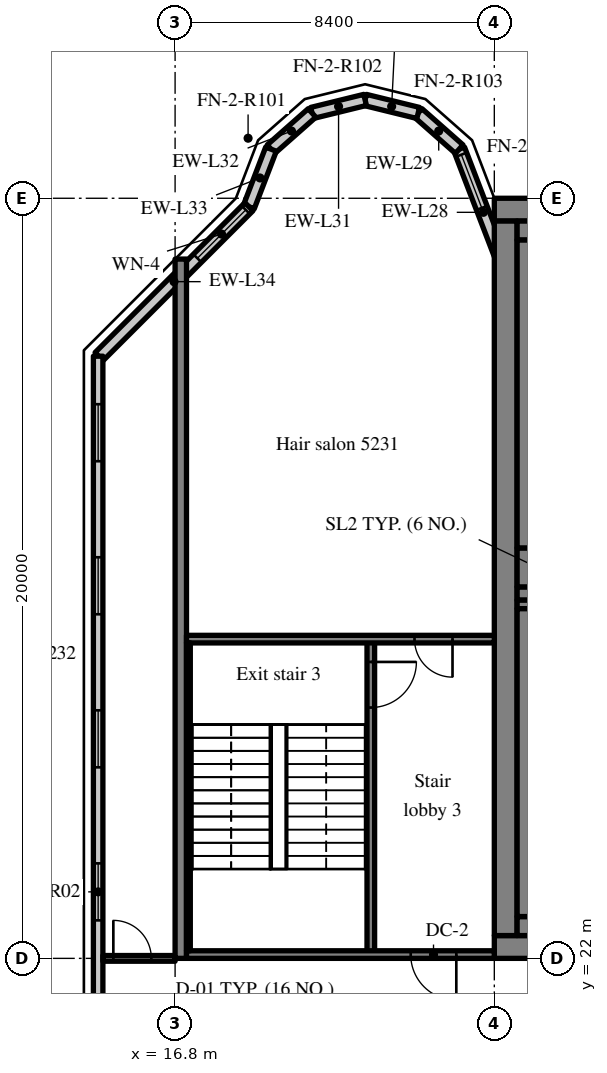
"""IFC4 building model, lengths in metres.
Left out: names, types, materials, properties, quantities, classifications, styles, units other than length and angle.
Written with IfcOpenShell. Run it as: python <this file> out.ifc"""

import sys

from ifc_helpers import new_model, si_unit, direction, frame, frame_2d, origin, place, context, subcontext, project, spatial, rectangle, extrude, source, transform, mapped, element, fill, save


model = new_model("IFC4")
c1 = context("Model", 3, precision=1e-05, world=origin(), true_north=direction((0.0, 1.0)))
c2 = subcontext(c1, "Body", "Model", "MODEL_VIEW")
j1 = project(units=[si_unit("LENGTHUNIT", "METRE"), si_unit("PLANEANGLEUNIT", "RADIAN")], contexts=[c1])
p1 = place(None, origin())
s1 = spatial("IfcSite", under=j1, at=p1, CompositionType="ELEMENT")
p2 = place(p1, origin())
s2 = spatial("IfcBuilding", under=s1, at=p2, CompositionType="ELEMENT")
p3 = place(p2, frame((0.0, 0.0, 217.9)))
s3 = spatial("IfcBuildingStorey", under=s2, at=p3, CompositionType="ELEMENT", Elevation=217.9)
m1 = source(origin(), c2, "Body", "SweptSolid", [
    extrude(rectangle(XDim=50.4, YDim=0.6, at=frame_2d((25.2, 0.0))), origin(), (0.0, 0.0, 1.0), 3.62),
])
p4 = place(p3, frame((25.2, 22.3, 0.0), z_axis=(0.0, 0.0, 1.0), x_axis=(1.0, 0.0, 0.0)))
e1 = element("IfcWall", 1, at=p4, inside=s3, PredefinedType="SHEAR", context=c2, shape_type="MappedRepresentation", body=[
    mapped(m1, transform((0.0, 0.0, 0.0), scale=1.0)),
])
m2 = source(origin(), c2, "Body", "SweptSolid", [
    extrude(rectangle(XDim=1.8, YDim=2.1, at=frame_2d((0.9, 1.05))), frame((0.0, 0.31, 0.0), z_axis=(0.0, -1.0, 0.0), x_axis=(1.0, 0.0, 0.0)), (0.0, 0.0, 1.0), 0.62),
])
p5 = place(p4, frame((15.9, 0.0, 0.0)))
e2 = element("IfcOpeningElement", 2, at=p5, cuts=e1, PredefinedType="OPENING", context=c2, shape_type="MappedRepresentation", body=[
    mapped(m2, transform((0.0, 0.0, 0.0), scale=1.0)),
])
m3 = source(origin(), c2, "Body", "SweptSolid", [
    extrude(rectangle(XDim=0.9, YDim=2.1, at=frame_2d((0.45, 1.05))), frame((0.0, 0.31, 0.0), z_axis=(0.0, -1.0, 0.0), x_axis=(1.0, 0.0, 0.0)), (0.0, 0.0, 1.0), 0.62),
])
p6 = place(p4, frame((9.687, 0.0, 0.0)))
e3 = element("IfcOpeningElement", 3, at=p6, cuts=e1, PredefinedType="OPENING", context=c2, shape_type="MappedRepresentation", body=[
    mapped(m3, transform((0.0, 0.0, 0.0), scale=1.0)),
])
p7 = place(p4, frame((21.513, 0.0, 0.0)))
e4 = element("IfcOpeningElement", 4, at=p7, cuts=e1, PredefinedType="OPENING", context=c2, shape_type="MappedRepresentation", body=[
    mapped(m3, transform((0.0, 0.0, 0.0), scale=1.0)),
])
p8 = place(p4, frame((32.7, 0.0, 0.0)))
e5 = element("IfcOpeningElement", 5, at=p8, cuts=e1, PredefinedType="OPENING", context=c2, shape_type="MappedRepresentation", body=[
    mapped(m2, transform((0.0, 0.0, 0.0), scale=1.0)),
])
m4 = source(origin(), c2, "Body", "SweptSolid", [
    extrude(rectangle(XDim=1.2, YDim=2.1, at=frame_2d((0.6, 1.05))), frame((0.0, 0.31, 0.0), z_axis=(0.0, -1.0, 0.0), x_axis=(1.0, 0.0, 0.0)), (0.0, 0.0, 1.0), 0.62),
])
p9 = place(p4, frame((6.488, 0.0, 0.0)))
e6 = element("IfcOpeningElement", 6, at=p9, cuts=e1, PredefinedType="OPENING", context=c2, shape_type="MappedRepresentation", body=[
    mapped(m4, transform((0.0, 0.0, 0.0), scale=1.0)),
])
p10 = place(p4, frame((47.925, 0.0, 0.0)))
e7 = element("IfcOpeningElement", 7, at=p10, cuts=e1, PredefinedType="OPENING", context=c2, shape_type="MappedRepresentation", body=[
    mapped(m4, transform((0.0, 0.0, 0.0), scale=1.0)),
])
p11 = place(p3, frame((25.2, 41.7, 0.0), z_axis=(0.0, 0.0, 1.0), x_axis=(1.0, 0.0, 0.0)))
e8 = element("IfcWall", 8, at=p11, inside=s3, PredefinedType="SHEAR", context=c2, shape_type="MappedRepresentation", body=[
    mapped(m1, transform((0.0, 0.0, 0.0), scale=1.0)),
])
m5 = source(origin(), c2, "Body", "SweptSolid", [
    extrude(rectangle(XDim=18.8, YDim=0.6, at=frame_2d((9.4, 0.0))), origin(), (0.0, 0.0, 1.0), 3.62),
])
p12 = place(p3, frame((25.5, 22.6, 0.0), z_axis=(0.0, 0.0, 1.0), x_axis=(0.0, 1.0, 0.0)))
e9 = element("IfcWall", 9, at=p12, inside=s3, PredefinedType="SHEAR", context=c2, shape_type="MappedRepresentation", body=[
    mapped(m5, transform((0.0, 0.0, 0.0), scale=1.0)),
])
m6 = source(origin(), c2, "Body", "SweptSolid", [
    extrude(rectangle(XDim=7.625, YDim=0.35, at=frame_2d((3.812, 0.0))), origin(), (0.0, 0.0, 1.0), 3.62),
])
p13 = place(p3, frame((25.8, 31.6, 0.0), z_axis=(0.0, 0.0, 1.0), x_axis=(1.0, 0.0, 0.0)))
e10 = element("IfcWall", 10, at=p13, inside=s3, PredefinedType="SHEAR", context=c2, shape_type="MappedRepresentation", body=[
    mapped(m6, transform((0.0, 0.0, 0.0), scale=1.0)),
])
m7 = source(origin(), c2, "Body", "SweptSolid", [
    extrude(rectangle(XDim=1.1, YDim=2.1, at=frame_2d((0.55, 1.05))), frame((0.0, 0.185, 0.0), z_axis=(0.0, -1.0, 0.0), x_axis=(1.0, 0.0, 0.0)), (0.0, 0.0, 1.0), 0.37),
])
p14 = place(p13, frame((5.938, 0.0, 0.0)))
e11 = element("IfcOpeningElement", 11, at=p14, cuts=e10, PredefinedType="OPENING", context=c2, shape_type="MappedRepresentation", body=[
    mapped(m7, transform((0.0, 0.0, 0.0), scale=1.0)),
])
m8 = source(origin(), c2, "Body", "SweptSolid", [
    extrude(rectangle(XDim=18.4, YDim=0.3, at=frame_2d((9.2, 0.0))), origin(), (0.0, 0.0, 1.0), 3.62),
])
p15 = place(p3, frame((16.95, 22.0, 0.0), z_axis=(0.0, 0.0, 1.0), x_axis=(0.0, 1.0, 0.0)))
e12 = element("IfcWall", 12, at=p15, inside=s3, PredefinedType="SHEAR", context=c2, shape_type="MappedRepresentation", body=[
    mapped(m8, transform((0.0, 0.0, 0.0), scale=1.0)),
])
m9 = source(origin(), c2, "Body", "SweptSolid", [
    extrude(rectangle(XDim=3.559, YDim=0.3, at=frame_2d((1.78, 0.0))), origin(), (0.0, 0.0, 1.0), 3.62),
])
p16 = place(p3, frame((25.55, 39.969, 0.0), z_axis=(0.0, 0.0, 1.0), x_axis=(-0.35779745313, 0.933799219604, 0.0)))
e13 = element("IfcWall", 13, at=p16, inside=s3, PredefinedType="SOLIDWALL", context=c2, shape_type="MappedRepresentation", body=[
    mapped(m9, transform((0.0, 0.0, 0.0), scale=1.0)),
])
m10 = source(origin(), c2, "Body", "SweptSolid", [
    extrude(rectangle(XDim=1.5, YDim=2.0, at=frame_2d((0.75, 1.0))), frame((0.0, 0.16, 0.0), z_axis=(0.0, -1.0, 0.0), x_axis=(1.0, 0.0, 0.0)), (0.0, 0.0, 1.0), 0.32),
])
p17 = place(p16, frame((1.903, 0.0, 0.9)))
e14 = element("IfcOpeningElement", 14, at=p17, cuts=e13, PredefinedType="OPENING", context=c2, shape_type="MappedRepresentation", body=[
    mapped(m10, transform((0.0, 0.0, 0.0), scale=1.0)),
])
m11 = source(origin(), c2, "Body", "SweptSolid", [
    extrude(rectangle(XDim=1.44, YDim=0.3, at=frame_2d((0.72, 0.0))), origin(), (0.0, 0.0, 1.0), 3.62),
])
p18 = place(p3, frame((24.277, 43.292, 0.0), z_axis=(0.0, 0.0, 1.0), x_axis=(-0.749649827867, 0.661834673902, 0.0)))
e15 = element("IfcWall", 15, at=p18, inside=s3, PredefinedType="SOLIDWALL", context=c2, shape_type="MappedRepresentation", body=[
    mapped(m11, transform((0.0, 0.0, 0.0), scale=1.0)),
])
m12 = source(origin(), c2, "Body", "SweptSolid", [
    extrude(rectangle(XDim=1.438, YDim=0.3, at=frame_2d((0.719, 0.0))), origin(), (0.0, 0.0, 1.0), 3.62),
])
p19 = place(p3, frame((23.197, 44.245, 0.0), z_axis=(0.0, 0.0, 1.0), x_axis=(-0.971152283879, 0.238460146601, 0.0)))
e16 = element("IfcWall", 16, at=p19, inside=s3, PredefinedType="SOLIDWALL", context=c2, shape_type="MappedRepresentation", body=[
    mapped(m12, transform((0.0, 0.0, 0.0), scale=1.0)),
])
m13 = source(origin(), c2, "Body", "SweptSolid", [
    extrude(rectangle(XDim=1.439, YDim=0.3, at=frame_2d((0.719, 0.0))), origin(), (0.0, 0.0, 1.0), 3.62),
])
p20 = place(p3, frame((21.8, 44.588, 0.0), z_axis=(0.0, 0.0, 1.0), x_axis=(-0.971161932466, -0.238420848351, 0.0)))
e17 = element("IfcWall", 17, at=p20, inside=s3, PredefinedType="SOLIDWALL", context=c2, shape_type="MappedRepresentation", body=[
    mapped(m13, transform((0.0, 0.0, 0.0), scale=1.0)),
])
m14 = source(origin(), c2, "Body", "SweptSolid", [
    extrude(rectangle(XDim=1.44, YDim=0.3, at=frame_2d((0.72, 0.0))), origin(), (0.0, 0.0, 1.0), 3.62),
])
p21 = place(p3, frame((20.403, 44.245, 0.0), z_axis=(0.0, 0.0, 1.0), x_axis=(-0.74957555648, -0.661918790432, 0.0)))
e18 = element("IfcWall", 18, at=p21, inside=s3, PredefinedType="SOLIDWALL", context=c2, shape_type="MappedRepresentation", body=[
    mapped(m14, transform((0.0, 0.0, 0.0), scale=1.0)),
])
m15 = source(origin(), c2, "Body", "SweptSolid", [
    extrude(rectangle(XDim=1.622, YDim=0.3, at=frame_2d((0.811, 0.0))), origin(), (0.0, 0.0, 1.0), 3.62),
])
p22 = place(p3, frame((19.323, 43.292, 0.0), z_axis=(0.0, 0.0, 1.0), x_axis=(-0.357778527068, -0.933806471154, 0.0)))
e19 = element("IfcWall", 19, at=p22, inside=s3, PredefinedType="SOLIDWALL", context=c2, shape_type="MappedRepresentation", body=[
    mapped(m15, transform((0.0, 0.0, 0.0), scale=1.0)),
])
m16 = source(origin(), c2, "Body", "SweptSolid", [
    extrude(rectangle(XDim=5.576, YDim=0.3, at=frame_2d((2.788, 0.0))), origin(), (0.0, 0.0, 1.0), 3.62),
])
p23 = place(p3, frame((18.743, 41.777, 0.0), z_axis=(0.0, 0.0, 1.0), x_axis=(-0.707106781187, -0.707106781187, 0.0)))
e20 = element("IfcWall", 20, at=p23, inside=s3, PredefinedType="SOLIDWALL", context=c2, shape_type="MappedRepresentation", body=[
    mapped(m16, transform((0.0, 0.0, 0.0), scale=1.0)),
])
m17 = source(origin(), c2, "Body", "SweptSolid", [
    extrude(rectangle(XDim=1.8, YDim=1.5, at=frame_2d((0.9, 0.75))), frame((0.0, 0.16, 0.0), z_axis=(0.0, -1.0, 0.0), x_axis=(1.0, 0.0, 0.0)), (0.0, 0.0, 1.0), 0.32),
])
p24 = place(p23, frame((0.118, 0.0, 0.9)))
e21 = element("IfcOpeningElement", 21, at=p24, cuts=e20, PredefinedType="OPENING", context=c2, shape_type="MappedRepresentation", body=[
    mapped(m17, transform((0.0, 0.0, 0.0), scale=1.0)),
])
m18 = source(origin(), c2, "Body", "SweptSolid", [
    extrude(rectangle(XDim=28.189, YDim=0.25, at=frame_2d((14.095, 0.0))), origin(), (0.0, 0.0, 1.0), 3.62),
])
p25 = place(p3, frame((14.775, 37.845, 0.0), z_axis=(0.0, 0.0, 1.0), x_axis=(0.0, -1.0, 0.0)))
e22 = element("IfcWall", 22, at=p25, inside=s3, PredefinedType="SOLIDWALL", context=c2, shape_type="MappedRepresentation", body=[
    mapped(m18, transform((0.0, 0.0, 0.0), scale=1.0)),
])
m19 = source(origin(), c2, "Body", "SweptSolid", [
    extrude(rectangle(XDim=1.5, YDim=1.5, at=frame_2d((0.75, 0.75))), frame((0.0, 0.135, 0.0), z_axis=(0.0, -1.0, 0.0), x_axis=(1.0, 0.0, 0.0)), (0.0, 0.0, 1.0), 0.27),
])
p26 = place(p25, frame((1.263, 0.0, 0.9)))
e23 = element("IfcOpeningElement", 23, at=p26, cuts=e22, PredefinedType="OPENING", context=c2, shape_type="MappedRepresentation", body=[
    mapped(m19, transform((0.0, 0.0, 0.0), scale=1.0)),
])
p27 = place(p25, frame((5.291, 0.0, 0.9)))
e24 = element("IfcOpeningElement", 24, at=p27, cuts=e22, PredefinedType="OPENING", context=c2, shape_type="MappedRepresentation", body=[
    mapped(m19, transform((0.0, 0.0, 0.0), scale=1.0)),
])
p28 = place(p25, frame((9.318, 0.0, 0.9)))
e25 = element("IfcOpeningElement", 25, at=p28, cuts=e22, PredefinedType="OPENING", context=c2, shape_type="MappedRepresentation", body=[
    mapped(m19, transform((0.0, 0.0, 0.0), scale=1.0)),
])
p29 = place(p25, frame((13.345, 0.0, 0.9)))
e26 = element("IfcOpeningElement", 26, at=p29, cuts=e22, PredefinedType="OPENING", context=c2, shape_type="MappedRepresentation", body=[
    mapped(m19, transform((0.0, 0.0, 0.0), scale=1.0)),
])
p30 = place(p25, frame((17.372, 0.0, 0.9)))
e27 = element("IfcOpeningElement", 27, at=p30, cuts=e22, PredefinedType="OPENING", context=c2, shape_type="MappedRepresentation", body=[
    mapped(m19, transform((0.0, 0.0, 0.0), scale=1.0)),
])
p31 = place(p25, frame((21.399, 0.0, 0.9)))
e28 = element("IfcOpeningElement", 28, at=p31, cuts=e22, PredefinedType="OPENING", context=c2, shape_type="MappedRepresentation", body=[
    mapped(m19, transform((0.0, 0.0, 0.0), scale=1.0)),
])
p32 = place(p25, frame((25.426, 0.0, 0.9)))
e29 = element("IfcOpeningElement", 29, at=p32, cuts=e22, PredefinedType="OPENING", context=c2, shape_type="MappedRepresentation", body=[
    mapped(m19, transform((0.0, 0.0, 0.0), scale=1.0)),
])
m20 = source(origin(), c2, "Body", "SweptSolid", [
    extrude(rectangle(XDim=8.3, YDim=0.2, at=frame_2d((4.15, 0.0))), origin(), (0.0, 0.0, 1.0), 3.62),
])
p33 = place(p3, frame((21.95, 22.1, 0.0), z_axis=(0.0, 0.0, 1.0), x_axis=(0.0, 1.0, 0.0)))
e30 = element("IfcWall", 30, at=p33, inside=s3, PredefinedType="SOLIDWALL", context=c2, shape_type="MappedRepresentation", body=[
    mapped(m20, transform((0.0, 0.0, 0.0), scale=1.0)),
])
m21 = source(origin(), c2, "Body", "SweptSolid", [
    extrude(rectangle(XDim=1.2, YDim=2.1, at=frame_2d((0.6, 1.05))), frame((0.0, 0.11, 0.0), z_axis=(0.0, -1.0, 0.0), x_axis=(1.0, 0.0, 0.0)), (0.0, 0.0, 1.0), 0.22),
])
p34 = place(p33, frame((6.5, 0.0, 0.0)))
e31 = element("IfcOpeningElement", 31, at=p34, cuts=e30, PredefinedType="OPENING", context=c2, shape_type="MappedRepresentation", body=[
    mapped(m21, transform((0.0, 0.0, 0.0), scale=1.0)),
])
m22 = source(origin(), c2, "Body", "SweptSolid", [
    extrude(rectangle(XDim=8.1, YDim=0.2, at=frame_2d((4.05, 0.0))), origin(), (0.0, 0.0, 1.0), 3.62),
])
p35 = place(p3, frame((17.1, 22.1, 0.0), z_axis=(0.0, 0.0, 1.0), x_axis=(1.0, 0.0, 0.0)))
e32 = element("IfcWall", 32, at=p35, inside=s3, PredefinedType="SOLIDWALL", context=c2, shape_type="MappedRepresentation", body=[
    mapped(m22, transform((0.0, 0.0, 0.0), scale=1.0)),
])
p36 = place(p35, frame((5.9, 0.0, 0.0)))
e33 = element("IfcOpeningElement", 33, at=p36, cuts=e32, PredefinedType="OPENING", context=c2, shape_type="MappedRepresentation", body=[
    mapped(m21, transform((0.0, 0.0, 0.0), scale=1.0)),
])
p37 = place(p3, frame((17.1, 30.4, 0.0), z_axis=(0.0, 0.0, 1.0), x_axis=(1.0, 0.0, 0.0)))
e34 = element("IfcWall", 34, at=p37, inside=s3, PredefinedType="SOLIDWALL", context=c2, shape_type="MappedRepresentation", body=[
    mapped(m22, transform((0.0, 0.0, 0.0), scale=1.0)),
])
m23 = source(origin(), c2, "Body", "SweptSolid", [
    extrude(rectangle(XDim=1.0, YDim=2.1, at=frame_2d((0.5, 1.05))), frame((0.0, 0.11, 0.0), z_axis=(0.0, -1.0, 0.0), x_axis=(1.0, 0.0, 0.0)), (0.0, 0.0, 1.0), 0.22),
])
p38 = place(p37, frame((6.0, 0.0, 0.0)))
e35 = element("IfcOpeningElement", 35, at=p38, cuts=e34, PredefinedType="OPENING", context=c2, shape_type="MappedRepresentation", body=[
    mapped(m23, transform((0.0, 0.0, 0.0), scale=1.0)),
])
m24 = source(origin(), c2, "Body", "SweptSolid", [
    extrude(rectangle(XDim=5.15, YDim=0.5, at=frame_2d((2.575, 0.0))), origin(), (0.0, 0.0, 1.0), 3.62),
])
p39 = place(p3, frame((25.8, 22.85, 0.0), z_axis=(0.0, 0.0, 1.0), x_axis=(1.0, 0.0, 0.0)))
e36 = element("IfcWall", 36, at=p39, inside=s3, PredefinedType="SOLIDWALL", context=c2, shape_type="MappedRepresentation", body=[
    mapped(m24, transform((0.0, 0.0, 0.0), scale=1.0)),
])
m25 = source(origin(), c2, "Body", "SweptSolid", [
    extrude(rectangle(XDim=5.15, YDim=0.225, at=frame_2d((2.575, 0.0))), origin(), (0.0, 0.0, 1.0), 3.62),
])
p40 = place(p3, frame((25.8, 31.312, 0.0), z_axis=(0.0, 0.0, 1.0), x_axis=(1.0, 0.0, 0.0)))
e37 = element("IfcWall", 37, at=p40, inside=s3, PredefinedType="SOLIDWALL", context=c2, shape_type="MappedRepresentation", body=[
    mapped(m25, transform((0.0, 0.0, 0.0), scale=1.0)),
])
m26 = source(origin(), c2, "Body", "SweptSolid", [
    extrude(rectangle(XDim=8.1, YDim=0.5, at=frame_2d((4.05, 0.0))), origin(), (0.0, 0.0, 1.0), 3.62),
])
p41 = place(p3, frame((26.05, 23.1, 0.0), z_axis=(0.0, 0.0, 1.0), x_axis=(0.0, 1.0, 0.0)))
e38 = element("IfcWall", 38, at=p41, inside=s3, PredefinedType="SOLIDWALL", context=c2, shape_type="MappedRepresentation", body=[
    mapped(m26, transform((0.0, 0.0, 0.0), scale=1.0)),
])
m27 = source(origin(), c2, "Body", "SweptSolid", [
    extrude(rectangle(XDim=8.1, YDim=0.1, at=frame_2d((4.05, 0.0))), origin(), (0.0, 0.0, 1.0), 3.62),
])
p42 = place(p3, frame((17.15, 22.2, 0.0), z_axis=(0.0, 0.0, 1.0), x_axis=(0.0, 1.0, 0.0)))
e39 = element("IfcWall", 39, at=p42, inside=s3, PredefinedType="SOLIDWALL", context=c2, shape_type="MappedRepresentation", body=[
    mapped(m27, transform((0.0, 0.0, 0.0), scale=1.0)),
])
p43 = place(p3, frame((25.8, 41.15, 0.0), z_axis=(0.0, 0.0, 1.0), x_axis=(1.0, 0.0, 0.0)))
e40 = element("IfcWall", 40, at=p43, inside=s3, PredefinedType="SOLIDWALL", context=c2, shape_type="MappedRepresentation", body=[
    mapped(m24, transform((0.0, 0.0, 0.0), scale=1.0)),
])
m28 = source(origin(), c2, "Body", "SweptSolid", [
    extrude(rectangle(XDim=5.15, YDim=1.025, at=frame_2d((2.575, 0.0))), origin(), (0.0, 0.0, 1.0), 3.62),
])
p44 = place(p3, frame((25.8, 32.287, 0.0), z_axis=(0.0, 0.0, 1.0), x_axis=(1.0, 0.0, 0.0)))
e41 = element("IfcWall", 41, at=p44, inside=s3, PredefinedType="SOLIDWALL", context=c2, shape_type="MappedRepresentation", body=[
    mapped(m28, transform((0.0, 0.0, 0.0), scale=1.0)),
])
p45 = place(p3, frame((26.05, 32.8, 0.0), z_axis=(0.0, 0.0, 1.0), x_axis=(0.0, 1.0, 0.0)))
e42 = element("IfcWall", 42, at=p45, inside=s3, PredefinedType="SOLIDWALL", context=c2, shape_type="MappedRepresentation", body=[
    mapped(m26, transform((0.0, 0.0, 0.0), scale=1.0)),
])
m29 = source(origin(), c2, "Body", "SweptSolid", [
    extrude(rectangle(XDim=1.9, YDim=0.15, at=frame_2d((0.95, 0.0))), origin(), (0.0, 0.0, 1.0), 2.92),
])
p46 = place(p3, frame((14.9, 22.0, 0.0), z_axis=(0.0, 0.0, 1.0), x_axis=(1.0, 0.0, 0.0)))
e43 = element("IfcWall", 43, at=p46, inside=s3, PredefinedType="PARTITIONING", context=c2, shape_type="MappedRepresentation", body=[
    mapped(m29, transform((0.0, 0.0, 0.0), scale=1.0)),
])
m30 = source(origin(), c2, "Body", "SweptSolid", [
    extrude(rectangle(XDim=1.0, YDim=2.1, at=frame_2d((0.5, 1.05))), frame((0.0, 0.085, 0.0), z_axis=(0.0, -1.0, 0.0), x_axis=(1.0, 0.0, 0.0)), (0.0, 0.0, 1.0), 0.17),
])
p47 = place(p46, frame((0.275, 0.0, 0.0)))
e44 = element("IfcOpeningElement", 44, at=p47, cuts=e43, PredefinedType="OPENING", context=c2, shape_type="MappedRepresentation", body=[
    mapped(m30, transform((0.0, 0.0, 0.0), scale=1.0)),
])
m31 = source(origin(), c2, "Body", "SweptSolid", [
    extrude(rectangle(XDim=1.5, YDim=2.0, at=frame_2d((0.75, 1.0))), frame((0.0, 0.03, 0.0), z_axis=(0.0, -1.0, 0.0), x_axis=(1.0, 0.0, 0.0)), (0.0, 0.0, 1.0), 0.06),
])
p48 = place(p17, origin())
e45 = element("IfcWindow", 45, at=p48, inside=s3, PartitioningType="SINGLE_PANEL", PredefinedType="WINDOW", context=c2, shape_type="MappedRepresentation", body=[
    mapped(m31, transform((0.0, 0.0, 0.0), scale=1.0)),
])
fill(e14, e45)
m32 = source(origin(), c2, "Body", "SweptSolid", [
    extrude(rectangle(XDim=1.8, YDim=1.5, at=frame_2d((0.9, 0.75))), frame((0.0, 0.03, 0.0), z_axis=(0.0, -1.0, 0.0), x_axis=(1.0, 0.0, 0.0)), (0.0, 0.0, 1.0), 0.06),
])
p49 = place(p24, origin())
e46 = element("IfcWindow", 46, at=p49, inside=s3, PartitioningType="SINGLE_PANEL", PredefinedType="WINDOW", context=c2, shape_type="MappedRepresentation", body=[
    mapped(m32, transform((0.0, 0.0, 0.0), scale=1.0)),
])
fill(e21, e46)
m33 = source(origin(), c2, "Body", "SweptSolid", [
    extrude(rectangle(XDim=1.5, YDim=1.5, at=frame_2d((0.75, 0.75))), frame((0.0, 0.03, 0.0), z_axis=(0.0, -1.0, 0.0), x_axis=(1.0, 0.0, 0.0)), (0.0, 0.0, 1.0), 0.06),
])
p50 = place(p26, origin())
e47 = element("IfcWindow", 47, at=p50, inside=s3, PartitioningType="SINGLE_PANEL", PredefinedType="WINDOW", context=c2, shape_type="MappedRepresentation", body=[
    mapped(m33, transform((0.0, 0.0, 0.0), scale=1.0)),
])
fill(e23, e47)
p51 = place(p27, origin())
e48 = element("IfcWindow", 48, at=p51, inside=s3, PartitioningType="SINGLE_PANEL", PredefinedType="WINDOW", context=c2, shape_type="MappedRepresentation", body=[
    mapped(m33, transform((0.0, 0.0, 0.0), scale=1.0)),
])
fill(e24, e48)
p52 = place(p28, origin())
e49 = element("IfcWindow", 49, at=p52, inside=s3, PartitioningType="SINGLE_PANEL", PredefinedType="WINDOW", context=c2, shape_type="MappedRepresentation", body=[
    mapped(m33, transform((0.0, 0.0, 0.0), scale=1.0)),
])
fill(e25, e49)
p53 = place(p29, origin())
e50 = element("IfcWindow", 50, at=p53, inside=s3, PartitioningType="SINGLE_PANEL", PredefinedType="WINDOW", context=c2, shape_type="MappedRepresentation", body=[
    mapped(m33, transform((0.0, 0.0, 0.0), scale=1.0)),
])
fill(e26, e50)
m34 = source(origin(), c2, "Body", "SweptSolid", [
    extrude(rectangle(XDim=1.2, YDim=2.1, at=frame_2d((0.6, 1.05))), frame((0.0, 0.025, 0.0), z_axis=(0.0, -1.0, 0.0), x_axis=(1.0, 0.0, 0.0)), (0.0, 0.0, 1.0), 0.05),
])
p54 = place(p34, origin())
e51 = element("IfcDoor", 51, at=p54, inside=s3, OperationType="SINGLE_SWING_RIGHT", PredefinedType="DOOR", context=c2, shape_type="MappedRepresentation", body=[
    mapped(m34, transform((0.0, 0.0, 0.0), scale=1.0)),
])
fill(e31, e51)
p55 = place(p36, origin())
e52 = element("IfcDoor", 52, at=p55, inside=s3, OperationType="SINGLE_SWING_RIGHT", PredefinedType="DOOR", context=c2, shape_type="MappedRepresentation", body=[
    mapped(m34, transform((0.0, 0.0, 0.0), scale=1.0)),
])
fill(e33, e52)
m35 = source(origin(), c2, "Body", "SweptSolid", [
    extrude(rectangle(XDim=1.0, YDim=2.1, at=frame_2d((0.5, 1.05))), frame((0.0, 0.025, 0.0), z_axis=(0.0, -1.0, 0.0), x_axis=(1.0, 0.0, 0.0)), (0.0, 0.0, 1.0), 0.05),
])
p56 = place(p38, origin())
e53 = element("IfcDoor", 53, at=p56, inside=s3, OperationType="SINGLE_SWING_RIGHT", PredefinedType="DOOR", context=c2, shape_type="MappedRepresentation", body=[
    mapped(m35, transform((0.0, 0.0, 0.0), scale=1.0)),
])
fill(e35, e53)
p57 = place(p47, origin())
e54 = element("IfcDoor", 54, at=p57, inside=s3, OperationType="SINGLE_SWING_LEFT", PredefinedType="DOOR", context=c2, shape_type="MappedRepresentation", body=[
    mapped(m35, transform((0.0, 0.0, 0.0), scale=1.0)),
])
fill(e44, e54)
save(model, sys.argv[1])
